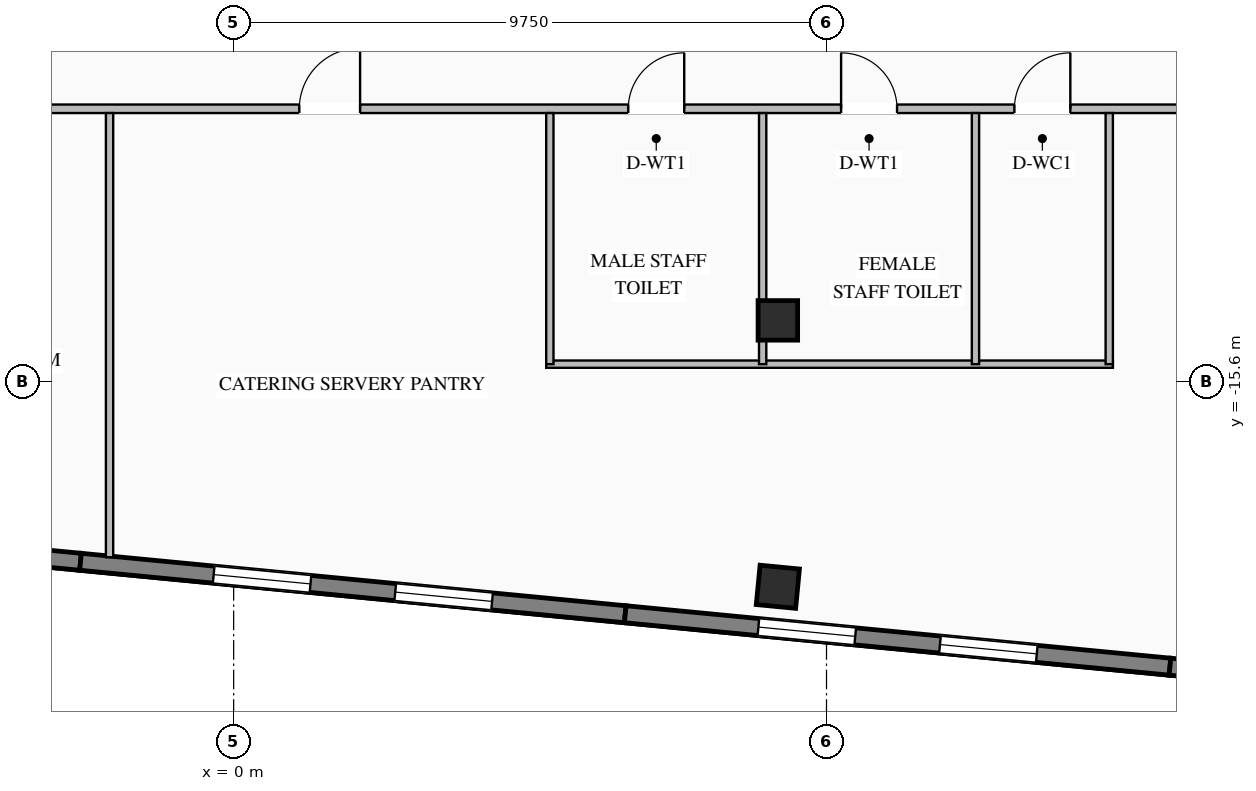
"""IFC4 building model, lengths in metres.
Left out: names, types, materials, properties, quantities, classifications, styles, units other than length and angle.
Written with IfcOpenShell. Run it as: python <this file> out.ifc"""

import sys

from ifc_helpers import new_model, si_unit, direction, frame, frame_2d, origin, origin_2d, place, context, subcontext, project, spatial, rectangle, i_section, extrude, element, fill, save


model = new_model("IFC4")
c1 = context("Model", 3, precision=1e-05, world=origin(), true_north=direction((0.0, 1.0)))
c2 = subcontext(c1, "Body", "Model", "MODEL_VIEW")
j1 = project(units=[si_unit("LENGTHUNIT", "METRE"), si_unit("PLANEANGLEUNIT", "RADIAN")], contexts=[c1])
p1 = place(None, origin())
s1 = spatial("IfcSite", under=j1, at=p1, CompositionType="ELEMENT")
p2 = place(p1, origin())
s2 = spatial("IfcBuilding", under=s1, at=p2, CompositionType="ELEMENT")
p3 = place(p2, frame((0.0, 0.0, 170.75)))
s3 = spatial("IfcBuildingStorey", under=s2, at=p3, CompositionType="ELEMENT", Elevation=170.75)
for number, where, z_axis, x_axis in (
    (1, (8.95, -14.6, 0.0), (0.0, 0.0, 1.0), (1.0, 0.0, 0.0)),
    (2, (8.95, -18.981, 0.0), (0.0, 0.0, 1.0), (0.995, -0.096, 0.0)),
):
    element("IfcColumn", number, at=place(p3, frame(where, z_axis=z_axis, x_axis=x_axis)), inside=s3, PredefinedType="COLUMN", context=c2, shape_type="SweptSolid", body=[
        extrude(i_section(OverallWidth=0.65, OverallDepth=0.65, WebThickness=0.028, FlangeThickness=0.04, at=origin_2d()), origin(), (0.0, 0.0, 1.0), 3.45),
    ])
p4 = place(p3, frame((-2.519, -18.57, 0.0), z_axis=(0.0, 0.0, 1.0), x_axis=(-0.995396794462, 0.09583956164, 0.0)))
e3 = element("IfcWall", 3, at=p4, inside=s3, PredefinedType="STANDARD", context=c2, shape_type="SweptSolid", body=[
    extrude(rectangle(XDim=9.0, YDim=0.28, at=frame_2d((4.5, 0.0))), origin(), (0.0, 0.0, 1.0), 3.25),
])
p5 = place(p4, frame((2.2, 0.0, 0.76)))
e4 = element("IfcOpeningElement", 4, at=p5, cuts=e3, PredefinedType="OPENING", context=c2, shape_type="SweptSolid", body=[
    extrude(rectangle(XDim=1.6, YDim=1.95, at=frame_2d((0.8, 0.975))), frame((0.0, 0.15, 0.0), z_axis=(0.0, -1.0, 0.0), x_axis=(1.0, 0.0, 0.0)), (0.0, 0.0, 1.0), 0.3),
])
p6 = place(p4, frame((5.2, 0.0, 0.76)))
e5 = element("IfcOpeningElement", 5, at=p6, cuts=e3, PredefinedType="OPENING", context=c2, shape_type="SweptSolid", body=[
    extrude(rectangle(XDim=1.6, YDim=1.95, at=frame_2d((0.8, 0.975))), frame((0.0, 0.15, 0.0), z_axis=(0.0, -1.0, 0.0), x_axis=(1.0, 0.0, 0.0)), (0.0, 0.0, 1.0), 0.3),
])
p7 = place(p3, frame((6.44, -19.433, 0.0), z_axis=(0.0, 0.0, 1.0), x_axis=(-0.995396794462, 0.09583956164, 0.0)))
e6 = element("IfcWall", 6, at=p7, inside=s3, PredefinedType="STANDARD", context=c2, shape_type="SweptSolid", body=[
    extrude(rectangle(XDim=9.0, YDim=0.28, at=frame_2d((4.5, 0.0))), origin(), (0.0, 0.0, 1.0), 3.25),
])
p8 = place(p7, frame((2.2, 0.0, 0.76)))
e7 = element("IfcOpeningElement", 7, at=p8, cuts=e6, PredefinedType="OPENING", context=c2, shape_type="SweptSolid", body=[
    extrude(rectangle(XDim=1.6, YDim=1.95, at=frame_2d((0.8, 0.975))), frame((0.0, 0.15, 0.0), z_axis=(0.0, -1.0, 0.0), x_axis=(1.0, 0.0, 0.0)), (0.0, 0.0, 1.0), 0.3),
])
p9 = place(p7, frame((5.2, 0.0, 0.76)))
e8 = element("IfcOpeningElement", 8, at=p9, cuts=e6, PredefinedType="OPENING", context=c2, shape_type="SweptSolid", body=[
    extrude(rectangle(XDim=1.6, YDim=1.95, at=frame_2d((0.8, 0.975))), frame((0.0, 0.15, 0.0), z_axis=(0.0, -1.0, 0.0), x_axis=(1.0, 0.0, 0.0)), (0.0, 0.0, 1.0), 0.3),
])
p10 = place(p3, frame((15.399, -20.296, 0.0), z_axis=(0.0, 0.0, 1.0), x_axis=(-0.995394455533, 0.09586385082, 0.0)))
e9 = element("IfcWall", 9, at=p10, inside=s3, PredefinedType="STANDARD", context=c2, shape_type="SweptSolid", body=[
    extrude(rectangle(XDim=9.0, YDim=0.28, at=frame_2d((4.5, 0.0))), origin(), (0.0, 0.0, 1.0), 3.25),
])
p11 = place(p10, frame((2.2, 0.0, 0.76)))
e10 = element("IfcOpeningElement", 10, at=p11, cuts=e9, PredefinedType="OPENING", context=c2, shape_type="SweptSolid", body=[
    extrude(rectangle(XDim=1.6, YDim=1.95, at=frame_2d((0.8, 0.975))), frame((0.0, 0.15, 0.0), z_axis=(0.0, -1.0, 0.0), x_axis=(1.0, 0.0, 0.0)), (0.0, 0.0, 1.0), 0.3),
])
p12 = place(p10, frame((5.2, 0.0, 0.76)))
e11 = element("IfcOpeningElement", 11, at=p12, cuts=e9, PredefinedType="OPENING", context=c2, shape_type="SweptSolid", body=[
    extrude(rectangle(XDim=1.6, YDim=1.95, at=frame_2d((0.8, 0.975))), frame((0.0, 0.15, 0.0), z_axis=(0.0, -1.0, 0.0), x_axis=(1.0, 0.0, 0.0)), (0.0, 0.0, 1.0), 0.3),
])
p13 = place(p3, frame((29.673, -21.67, 0.0), z_axis=(0.0, 0.0, 1.0), x_axis=(-0.995397230529, 0.095835032509, 0.0)))
e12 = element("IfcWall", 12, at=p13, inside=s3, PredefinedType="STANDARD", context=c2, shape_type="SweptSolid", body=[
    extrude(rectangle(XDim=14.34, YDim=0.28, at=frame_2d((7.17, 0.0))), origin(), (0.0, 0.0, 1.0), 3.25),
])
p14 = place(p13, frame((3.43, 0.0, 0.76)))
e13 = element("IfcOpeningElement", 13, at=p14, cuts=e12, PredefinedType="OPENING", context=c2, shape_type="SweptSolid", body=[
    extrude(rectangle(XDim=1.6, YDim=1.95, at=frame_2d((0.8, 0.975))), frame((0.0, 0.15, 0.0), z_axis=(0.0, -1.0, 0.0), x_axis=(1.0, 0.0, 0.0)), (0.0, 0.0, 1.0), 0.3),
])
p15 = place(p13, frame((8.76, 0.0, 0.76)))
e14 = element("IfcOpeningElement", 14, at=p15, cuts=e12, PredefinedType="OPENING", context=c2, shape_type="SweptSolid", body=[
    extrude(rectangle(XDim=1.6, YDim=1.95, at=frame_2d((0.8, 0.975))), frame((0.0, 0.15, 0.0), z_axis=(0.0, -1.0, 0.0), x_axis=(1.0, 0.0, 0.0)), (0.0, 0.0, 1.0), 0.3),
])
p16 = place(p3, frame((-27.54, -11.12, 0.0), z_axis=(0.0, 0.0, 1.0), x_axis=(1.0, 0.0, 0.0)))
e15 = element("IfcWall", 15, at=p16, inside=s3, PredefinedType="STANDARD", context=c2, shape_type="SweptSolid", body=[
    extrude(rectangle(XDim=60.519, YDim=0.14, at=frame_2d((30.259, 0.0))), origin(), (0.0, 0.0, 1.0), 3.25),
])
p17 = place(p16, frame((34.03, 0.0, 0.0)))
e16 = element("IfcOpeningElement", 16, at=p17, cuts=e15, PredefinedType="OPENING", context=c2, shape_type="SweptSolid", body=[
    extrude(rectangle(XDim=0.92, YDim=2.08, at=frame_2d((0.46, 1.04))), frame((0.0, 0.08, 0.0), z_axis=(0.0, -1.0, 0.0), x_axis=(1.0, 0.0, 0.0)), (0.0, 0.0, 1.0), 0.16),
])
p18 = place(p16, frame((37.53, 0.0, 0.0)))
e17 = element("IfcOpeningElement", 17, at=p18, cuts=e15, PredefinedType="OPENING", context=c2, shape_type="SweptSolid", body=[
    extrude(rectangle(XDim=0.92, YDim=2.08, at=frame_2d((0.46, 1.04))), frame((0.0, 0.08, 0.0), z_axis=(0.0, -1.0, 0.0), x_axis=(1.0, 0.0, 0.0)), (0.0, 0.0, 1.0), 0.16),
])
p19 = place(p16, frame((40.38, 0.0, 0.0)))
e18 = element("IfcOpeningElement", 18, at=p19, cuts=e15, PredefinedType="OPENING", context=c2, shape_type="SweptSolid", body=[
    extrude(rectangle(XDim=0.92, YDim=2.08, at=frame_2d((0.46, 1.04))), frame((0.0, 0.08, 0.0), z_axis=(0.0, -1.0, 0.0), x_axis=(1.0, 0.0, 0.0)), (0.0, 0.0, 1.0), 0.16),
])
p20 = place(p16, frame((3.653, 0.0, 0.0)))
e19 = element("IfcOpeningElement", 19, at=p20, cuts=e15, PredefinedType="OPENING", context=c2, shape_type="SweptSolid", body=[
    extrude(rectangle(XDim=1.0, YDim=2.08, at=frame_2d((0.5, 1.04))), frame((0.0, 0.08, 0.0), z_axis=(0.0, -1.0, 0.0), x_axis=(1.0, 0.0, 0.0)), (0.0, 0.0, 1.0), 0.16),
])
p21 = place(p16, frame((11.998, 0.0, 0.0)))
e20 = element("IfcOpeningElement", 20, at=p21, cuts=e15, PredefinedType="OPENING", context=c2, shape_type="SweptSolid", body=[
    extrude(rectangle(XDim=1.0, YDim=2.08, at=frame_2d((0.5, 1.04))), frame((0.0, 0.08, 0.0), z_axis=(0.0, -1.0, 0.0), x_axis=(1.0, 0.0, 0.0)), (0.0, 0.0, 1.0), 0.16),
])
p22 = place(p16, frame((20.72, 0.0, 0.0)))
e21 = element("IfcOpeningElement", 21, at=p22, cuts=e15, PredefinedType="OPENING", context=c2, shape_type="SweptSolid", body=[
    extrude(rectangle(XDim=1.0, YDim=2.08, at=frame_2d((0.5, 1.04))), frame((0.0, 0.08, 0.0), z_axis=(0.0, -1.0, 0.0), x_axis=(1.0, 0.0, 0.0)), (0.0, 0.0, 1.0), 0.16),
])
p23 = place(p16, frame((28.619, 0.0, 0.0)))
e22 = element("IfcOpeningElement", 22, at=p23, cuts=e15, PredefinedType="OPENING", context=c2, shape_type="SweptSolid", body=[
    extrude(rectangle(XDim=1.0, YDim=2.08, at=frame_2d((0.5, 1.04))), frame((0.0, 0.08, 0.0), z_axis=(0.0, -1.0, 0.0), x_axis=(1.0, 0.0, 0.0)), (0.0, 0.0, 1.0), 0.16),
])
p24 = place(p16, frame((43.754, 0.0, 0.0)))
e23 = element("IfcOpeningElement", 23, at=p24, cuts=e15, PredefinedType="OPENING", context=c2, shape_type="SweptSolid", body=[
    extrude(rectangle(XDim=1.0, YDim=2.08, at=frame_2d((0.5, 1.04))), frame((0.0, 0.08, 0.0), z_axis=(0.0, -1.0, 0.0), x_axis=(1.0, 0.0, 0.0)), (0.0, 0.0, 1.0), 0.16),
])
p25 = place(p16, frame((48.567, 0.0, 0.0)))
e24 = element("IfcOpeningElement", 24, at=p25, cuts=e15, PredefinedType="OPENING", context=c2, shape_type="SweptSolid", body=[
    extrude(rectangle(XDim=1.0, YDim=2.08, at=frame_2d((0.5, 1.04))), frame((0.0, 0.08, 0.0), z_axis=(0.0, -1.0, 0.0), x_axis=(1.0, 0.0, 0.0)), (0.0, 0.0, 1.0), 0.16),
])
p26 = place(p16, frame((53.472, 0.0, 0.0)))
e25 = element("IfcOpeningElement", 25, at=p26, cuts=e15, PredefinedType="OPENING", context=c2, shape_type="SweptSolid", body=[
    extrude(rectangle(XDim=1.0, YDim=2.08, at=frame_2d((0.5, 1.04))), frame((0.0, 0.08, 0.0), z_axis=(0.0, -1.0, 0.0), x_axis=(1.0, 0.0, 0.0)), (0.0, 0.0, 1.0), 0.16),
])
p27 = place(p16, frame((57.823, 0.0, 0.0)))
e26 = element("IfcOpeningElement", 26, at=p27, cuts=e15, PredefinedType="OPENING", context=c2, shape_type="SweptSolid", body=[
    extrude(rectangle(XDim=1.0, YDim=2.08, at=frame_2d((0.5, 1.04))), frame((0.0, 0.08, 0.0), z_axis=(0.0, -1.0, 0.0), x_axis=(1.0, 0.0, 0.0)), (0.0, 0.0, 1.0), 0.16),
])
p28 = place(p3, frame((5.14, -15.32, 0.0), z_axis=(0.0, 0.0, 1.0), x_axis=(1.0, 0.0, 0.0)))
e27 = element("IfcWall", 27, at=p28, inside=s3, PredefinedType="STANDARD", context=c2, shape_type="SweptSolid", body=[
    extrude(rectangle(XDim=9.32, YDim=0.12, at=frame_2d((4.66, 0.0))), origin(), (0.0, 0.0, 1.0), 3.25),
])
for number, where, z_axis, x_axis in (
    (28, (5.2, -15.32, 0.0), (0.0, 0.0, 1.0), (0.0, 1.0, 0.0)),
    (29, (8.7, -15.32, 0.0), (0.0, 0.0, 1.0), (0.0, 1.0, 0.0)),
    (30, (12.2, -15.32, 0.0), (0.0, 0.0, 1.0), (0.0, 1.0, 0.0)),
    (31, (14.4, -15.32, 0.0), (0.0, 0.0, 1.0), (0.0, 1.0, 0.0)),
):
    element("IfcWall", number, at=place(p3, frame(where, z_axis=z_axis, x_axis=x_axis)), inside=s3, PredefinedType="STANDARD", context=c2, shape_type="SweptSolid", body=[
        extrude(rectangle(XDim=4.13, YDim=0.12, at=frame_2d((2.065, 0.0))), origin(), (0.0, 0.0, 1.0), 3.25),
    ])
p29 = place(p3, frame((-2.041, -18.496, 0.0), z_axis=(0.0, 0.0, 1.0), x_axis=(0.0, 1.0, 0.0)))
e32 = element("IfcWall", 32, at=p29, inside=s3, PredefinedType="STANDARD", context=c2, shape_type="SweptSolid", body=[
    extrude(rectangle(XDim=7.306, YDim=0.12, at=frame_2d((3.653, 0.0))), origin(), (0.0, 0.0, 1.0), 3.25),
])
p30 = place(p8, origin())
e33 = element("IfcWindow", 33, at=p30, inside=s3, PartitioningType="SINGLE_PANEL", PredefinedType="WINDOW", context=c2, shape_type="SweptSolid", body=[
    extrude(rectangle(XDim=1.6, YDim=1.95, at=frame_2d((0.8, 0.975))), frame((0.0, 0.03, 0.0), z_axis=(0.0, -1.0, 0.0), x_axis=(1.0, 0.0, 0.0)), (0.0, 0.0, 1.0), 0.06),
])
fill(e7, e33)
p31 = place(p9, origin())
e34 = element("IfcWindow", 34, at=p31, inside=s3, PartitioningType="SINGLE_PANEL", PredefinedType="WINDOW", context=c2, shape_type="SweptSolid", body=[
    extrude(rectangle(XDim=1.6, YDim=1.95, at=frame_2d((0.8, 0.975))), frame((0.0, 0.03, 0.0), z_axis=(0.0, -1.0, 0.0), x_axis=(1.0, 0.0, 0.0)), (0.0, 0.0, 1.0), 0.06),
])
fill(e8, e34)
p32 = place(p11, origin())
e35 = element("IfcWindow", 35, at=p32, inside=s3, PartitioningType="SINGLE_PANEL", PredefinedType="WINDOW", context=c2, shape_type="SweptSolid", body=[
    extrude(rectangle(XDim=1.6, YDim=1.95, at=frame_2d((0.8, 0.975))), frame((0.0, 0.03, 0.0), z_axis=(0.0, -1.0, 0.0), x_axis=(1.0, 0.0, 0.0)), (0.0, 0.0, 1.0), 0.06),
])
fill(e10, e35)
p33 = place(p12, origin())
e36 = element("IfcWindow", 36, at=p33, inside=s3, PartitioningType="SINGLE_PANEL", PredefinedType="WINDOW", context=c2, shape_type="SweptSolid", body=[
    extrude(rectangle(XDim=1.6, YDim=1.95, at=frame_2d((0.8, 0.975))), frame((0.0, 0.03, 0.0), z_axis=(0.0, -1.0, 0.0), x_axis=(1.0, 0.0, 0.0)), (0.0, 0.0, 1.0), 0.06),
])
fill(e11, e36)
p34 = place(p17, origin())
e37 = element("IfcDoor", 37, at=p34, inside=s3, OperationType="SINGLE_SWING_RIGHT", PredefinedType="DOOR", context=c2, shape_type="SweptSolid", body=[
    extrude(rectangle(XDim=0.92, YDim=2.08, at=frame_2d((0.46, 1.04))), frame((0.0, 0.025, 0.0), z_axis=(0.0, -1.0, 0.0), x_axis=(1.0, 0.0, 0.0)), (0.0, 0.0, 1.0), 0.05),
])
fill(e16, e37)
p35 = place(p18, origin())
e38 = element("IfcDoor", 38, at=p35, inside=s3, OperationType="SINGLE_SWING_LEFT", PredefinedType="DOOR", context=c2, shape_type="SweptSolid", body=[
    extrude(rectangle(XDim=0.92, YDim=2.08, at=frame_2d((0.46, 1.04))), frame((0.0, 0.025, 0.0), z_axis=(0.0, -1.0, 0.0), x_axis=(1.0, 0.0, 0.0)), (0.0, 0.0, 1.0), 0.05),
])
fill(e17, e38)
p36 = place(p19, origin())
e39 = element("IfcDoor", 39, at=p36, inside=s3, OperationType="SINGLE_SWING_RIGHT", PredefinedType="DOOR", context=c2, shape_type="SweptSolid", body=[
    extrude(rectangle(XDim=0.92, YDim=2.08, at=frame_2d((0.46, 1.04))), frame((0.0, 0.025, 0.0), z_axis=(0.0, -1.0, 0.0), x_axis=(1.0, 0.0, 0.0)), (0.0, 0.0, 1.0), 0.05),
])
fill(e18, e39)
p37 = place(p23, origin())
e40 = element("IfcDoor", 40, at=p37, inside=s3, OperationType="SINGLE_SWING_RIGHT", PredefinedType="DOOR", context=c2, shape_type="SweptSolid", body=[
    extrude(rectangle(XDim=1.0, YDim=2.08, at=frame_2d((0.5, 1.04))), frame((0.0, 0.025, 0.0), z_axis=(0.0, -1.0, 0.0), x_axis=(1.0, 0.0, 0.0)), (0.0, 0.0, 1.0), 0.05),
])
fill(e22, e40)
save(model, sys.argv[1])
